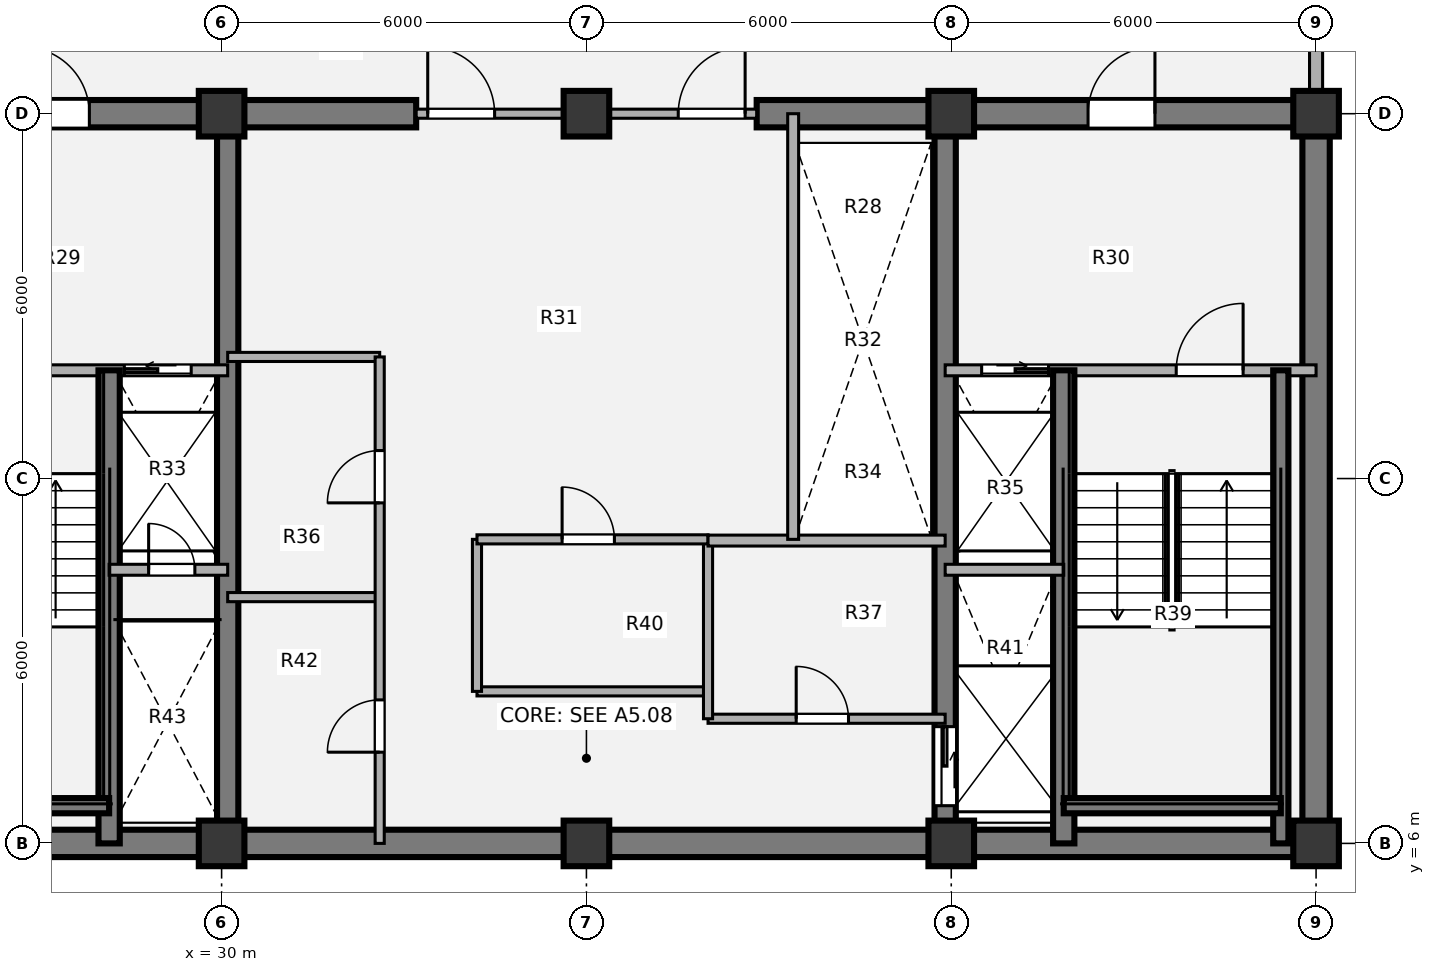
"""IFC4 building model, lengths in metres.
Left out: names, types, materials, properties, quantities, classifications, styles, units other than length and angle.
Written with IfcOpenShell. Run it as: python <this file> out.ifc"""

import sys

from ifc_helpers import new_model, si_unit, direction, frame, frame_2d, origin, origin_2d, place, context, subcontext, project, spatial, rectangle, extrude, source, transform, mapped, element, fill, save


model = new_model("IFC4")
c1 = context("Model", 3, precision=1e-05, world=origin(), true_north=direction((0.0, 1.0)))
c2 = subcontext(c1, "Body", "Model", "MODEL_VIEW")
j1 = project(units=[si_unit("LENGTHUNIT", "METRE"), si_unit("PLANEANGLEUNIT", "RADIAN")], contexts=[c1])
p1 = place(None, origin())
s1 = spatial("IfcSite", under=j1, at=p1, CompositionType="ELEMENT")
p2 = place(p1, origin())
s2 = spatial("IfcBuilding", under=s1, at=p2, CompositionType="ELEMENT")
p3 = place(p2, frame((0.0, 0.0, 163.98)))
s3 = spatial("IfcBuildingStorey", under=s2, at=p3, CompositionType="ELEMENT", Elevation=163.98)
m1 = source(origin(), c2, "Body", "SweptSolid", [
    extrude(rectangle(XDim=0.75, YDim=0.75, at=origin_2d()), origin(), (0.0, 0.0, 1.0), 3.78),
])
for number, where, z_axis, x_axis in (
    (1, (30.0, 6.0, 0.0), (0.0, 0.0, 1.0), (1.0, 0.0, 0.0)),
    (2, (36.0, 6.0, 0.0), (0.0, 0.0, 1.0), (1.0, 0.0, 0.0)),
    (3, (42.0, 6.0, 0.0), (0.0, 0.0, 1.0), (1.0, 0.0, 0.0)),
    (4, (48.0, 6.0, 0.0), (0.0, 0.0, 1.0), (1.0, 0.0, 0.0)),
    (5, (30.0, 18.0, 0.0), (0.0, 0.0, 1.0), (1.0, 0.0, 0.0)),
    (6, (36.0, 18.0, 0.0), (0.0, 0.0, 1.0), (1.0, 0.0, 0.0)),
    (7, (42.0, 18.0, 0.0), (0.0, 0.0, 1.0), (1.0, 0.0, 0.0)),
    (8, (48.0, 18.0, 0.0), (0.0, 0.0, 1.0), (1.0, 0.0, 0.0)),
):
    element("IfcColumn", number, at=place(p3, frame(where, z_axis=z_axis, x_axis=x_axis)), inside=s3, PredefinedType="COLUMN", context=c2, shape_type="MappedRepresentation", body=[
        mapped(m1, transform((0.0, 0.0, 0.0), x_axis=(1.0, 0.0, 0.0), y_axis=(0.0, 1.0, 0.0), z_axis=(0.0, 0.0, 1.0), scale=1.0)),
    ])
p4 = place(p3, frame((48.225, 6.0, 0.0), z_axis=(0.0, 0.0, 1.0), x_axis=(-1.0, 0.0, 0.0)))
e9 = element("IfcWall", 9, at=p4, inside=s3, PredefinedType="SHEAR", context=c2, shape_type="SweptSolid", body=[
    extrude(rectangle(XDim=24.45, YDim=0.45, at=frame_2d((12.225, 0.0))), origin(), (0.0, 0.0, 1.0), 3.78),
])
p5 = place(p3, frame((48.0, 18.0, 0.0), z_axis=(0.0, 0.0, 1.0), x_axis=(0.0, -1.0, 0.0)))
e10 = element("IfcWall", 10, at=p5, inside=s3, PredefinedType="SHEAR", context=c2, shape_type="SweptSolid", body=[
    extrude(rectangle(XDim=12.0, YDim=0.45, at=frame_2d((6.0, 0.0))), origin(), (0.0, 0.0, 1.0), 3.78),
])
p6 = place(p3, frame((23.775, 18.0, 0.0), z_axis=(0.0, 0.0, 1.0), x_axis=(1.0, 0.0, 0.0)))
e11 = element("IfcWall", 11, at=p6, inside=s3, PredefinedType="SHEAR", context=c2, shape_type="SweptSolid", body=[
    extrude(rectangle(XDim=9.425, YDim=0.45, at=frame_2d((4.712, 0.0))), origin(), (0.0, 0.0, 1.0), 3.78),
])
p7 = place(p6, frame((2.95, 0.0, 0.0)))
e12 = element("IfcOpeningElement", 12, at=p7, cuts=e11, PredefinedType="OPENING", context=c2, shape_type="SweptSolid", body=[
    extrude(rectangle(XDim=1.1, YDim=2.1, at=origin_2d()), frame((0.55, 0.235, 1.05), z_axis=(0.0, -1.0, 0.0), x_axis=(1.0, 0.0, 0.0)), (0.0, 0.0, 1.0), 0.47),
])
p8 = place(p3, frame((38.8, 18.0, 0.0), z_axis=(0.0, 0.0, 1.0), x_axis=(1.0, 0.0, 0.0)))
e13 = element("IfcWall", 13, at=p8, inside=s3, PredefinedType="SHEAR", context=c2, shape_type="SweptSolid", body=[
    extrude(rectangle(XDim=9.425, YDim=0.45, at=frame_2d((4.712, 0.0))), origin(), (0.0, 0.0, 1.0), 3.78),
])
p9 = place(p8, frame((5.45, 0.0, 0.0)))
e14 = element("IfcOpeningElement", 14, at=p9, cuts=e13, PredefinedType="OPENING", context=c2, shape_type="SweptSolid", body=[
    extrude(rectangle(XDim=1.1, YDim=2.1, at=origin_2d()), frame((0.55, 0.235, 1.05), z_axis=(0.0, -1.0, 0.0), x_axis=(1.0, 0.0, 0.0)), (0.0, 0.0, 1.0), 0.47),
])
p10 = place(p3, frame((30.1, 6.0, 0.0), z_axis=(0.0, 0.0, 1.0), x_axis=(0.0, 1.0, 0.0)))
e15 = element("IfcWall", 15, at=p10, inside=s3, PredefinedType="SHEAR", context=c2, shape_type="SweptSolid", body=[
    extrude(rectangle(XDim=12.0, YDim=0.35, at=frame_2d((6.0, 0.0))), origin(), (0.0, 0.0, 1.0), 3.78),
])
p11 = place(p3, frame((41.9, 18.0, 0.0), z_axis=(0.0, 0.0, 1.0), x_axis=(0.0, -1.0, 0.0)))
e16 = element("IfcWall", 16, at=p11, inside=s3, PredefinedType="SHEAR", context=c2, shape_type="SweptSolid", body=[
    extrude(rectangle(XDim=12.0, YDim=0.35, at=frame_2d((6.0, 0.0))), origin(), (0.0, 0.0, 1.0), 3.78),
])
p12 = place(p11, frame((10.08, 0.0, 0.0)))
e17 = element("IfcOpeningElement", 17, at=p12, cuts=e16, PredefinedType="OPENING", context=c2, shape_type="SweptSolid", body=[
    extrude(rectangle(XDim=1.3, YDim=2.1, at=origin_2d()), frame((0.65, 0.185, 1.05), z_axis=(0.0, -1.0, 0.0), x_axis=(1.0, 0.0, 0.0)), (0.0, 0.0, 1.0), 0.37),
])
p13 = place(p3, frame((48.0, 21.05, 0.0), z_axis=(0.0, 0.0, 1.0), x_axis=(0.0, -1.0, 0.0)))
e18 = element("IfcWall", 18, at=p13, inside=s3, PredefinedType="SOLIDWALL", context=c2, shape_type="SweptSolid", body=[
    extrude(rectangle(XDim=2.695, YDim=0.215, at=frame_2d((1.348, 0.0))), origin(), (0.0, 0.0, 1.0), 2.718),
])
p14 = place(p3, frame((30.1, 14.0, 0.0), z_axis=(0.0, 0.0, 1.0), x_axis=(1.0, 0.0, 0.0)))
e19 = element("IfcWall", 19, at=p14, inside=s3, PredefinedType="PARTITIONING", context=c2, shape_type="SweptSolid", body=[
    extrude(rectangle(XDim=2.5, YDim=0.15, at=frame_2d((1.25, 0.0))), origin(), (0.0, 0.0, 1.0), 3.5),
])
p15 = place(p3, frame((34.2, 8.5, 0.0), z_axis=(0.0, 0.0, 1.0), x_axis=(1.0, 0.0, 0.0)))
e20 = element("IfcWall", 20, at=p15, inside=s3, PredefinedType="PARTITIONING", context=c2, shape_type="SweptSolid", body=[
    extrude(rectangle(XDim=3.8, YDim=0.15, at=frame_2d((1.9, 0.0))), origin(), (0.0, 0.0, 1.0), 3.5),
])
p16 = place(p3, frame((38.0, 8.05, 0.0), z_axis=(0.0, 0.0, 1.0), x_axis=(1.0, 0.0, 0.0)))
e21 = element("IfcWall", 21, at=p16, inside=s3, PredefinedType="PARTITIONING", context=c2, shape_type="SweptSolid", body=[
    extrude(rectangle(XDim=3.9, YDim=0.15, at=frame_2d((1.95, 0.0))), origin(), (0.0, 0.0, 1.0), 3.5),
])
p17 = place(p16, frame((1.45, 0.0, 0.0)))
e22 = element("IfcOpeningElement", 22, at=p17, cuts=e21, PredefinedType="OPENING", context=c2, shape_type="SweptSolid", body=[
    extrude(rectangle(XDim=0.86, YDim=2.1, at=origin_2d()), frame((0.43, 0.085, 1.05), z_axis=(0.0, -1.0, 0.0), x_axis=(1.0, 0.0, 0.0)), (0.0, 0.0, 1.0), 0.17),
])
p18 = place(p3, frame((34.2, 8.5, 0.0), z_axis=(0.0, 0.0, 1.0), x_axis=(0.0, 1.0, 0.0)))
e23 = element("IfcWall", 23, at=p18, inside=s3, PredefinedType="PARTITIONING", context=c2, shape_type="SweptSolid", body=[
    extrude(rectangle(XDim=2.5, YDim=0.15, at=frame_2d((1.25, 0.0))), origin(), (0.0, 0.0, 1.0), 3.5),
])
p19 = place(p3, frame((38.0, 8.05, 0.0), z_axis=(0.0, 0.0, 1.0), x_axis=(0.0, 1.0, 0.0)))
e24 = element("IfcWall", 24, at=p19, inside=s3, PredefinedType="PARTITIONING", context=c2, shape_type="SweptSolid", body=[
    extrude(rectangle(XDim=2.95, YDim=0.15, at=frame_2d((1.475, 0.0))), origin(), (0.0, 0.0, 1.0), 3.5),
])
p20 = place(p3, frame((34.2, 11.0, 0.0), z_axis=(0.0, 0.0, 1.0), x_axis=(1.0, 0.0, 0.0)))
e25 = element("IfcWall", 25, at=p20, inside=s3, PredefinedType="PARTITIONING", context=c2, shape_type="SweptSolid", body=[
    extrude(rectangle(XDim=3.8, YDim=0.15, at=frame_2d((1.9, 0.0))), origin(), (0.0, 0.0, 1.0), 3.5),
])
p21 = place(p20, frame((1.4, 0.0, 0.0)))
e26 = element("IfcOpeningElement", 26, at=p21, cuts=e25, PredefinedType="OPENING", context=c2, shape_type="SweptSolid", body=[
    extrude(rectangle(XDim=0.86, YDim=2.1, at=origin_2d()), frame((0.43, 0.085, 1.05), z_axis=(0.0, -1.0, 0.0), x_axis=(1.0, 0.0, 0.0)), (0.0, 0.0, 1.0), 0.17),
])
p22 = place(p3, frame((38.0, 10.98, 0.0), z_axis=(0.0, 0.0, 1.0), x_axis=(1.0, 0.0, 0.0)))
e27 = element("IfcWall", 27, at=p22, inside=s3, PredefinedType="PARTITIONING", context=c2, shape_type="SweptSolid", body=[
    extrude(rectangle(XDim=3.9, YDim=0.18, at=frame_2d((1.95, 0.0))), origin(), (0.0, 0.0, 1.0), 3.5),
])
p23 = place(p3, frame((39.4, 11.0, 0.0), z_axis=(0.0, 0.0, 1.0), x_axis=(0.0, 1.0, 0.0)))
e28 = element("IfcWall", 28, at=p23, inside=s3, PredefinedType="PARTITIONING", context=c2, shape_type="SweptSolid", body=[
    extrude(rectangle(XDim=7.0, YDim=0.18, at=frame_2d((3.5, 0.0))), origin(), (0.0, 0.0, 1.0), 3.5),
])
p24 = place(p3, frame((30.1, 10.05, 0.0), z_axis=(0.0, 0.0, 1.0), x_axis=(1.0, 0.0, 0.0)))
e29 = element("IfcWall", 29, at=p24, inside=s3, PredefinedType="PARTITIONING", context=c2, shape_type="SweptSolid", body=[
    extrude(rectangle(XDim=2.5, YDim=0.15, at=frame_2d((1.25, 0.0))), origin(), (0.0, 0.0, 1.0), 3.5),
])
p25 = place(p3, frame((32.6, 6.0, 0.0), z_axis=(0.0, 0.0, 1.0), x_axis=(0.0, 1.0, 0.0)))
e30 = element("IfcWall", 30, at=p25, inside=s3, PredefinedType="PARTITIONING", context=c2, shape_type="SweptSolid", body=[
    extrude(rectangle(XDim=8.0, YDim=0.15, at=frame_2d((4.0, 0.0))), origin(), (0.0, 0.0, 1.0), 3.5),
])
p26 = place(p25, frame((1.5, 0.0, 0.0)))
e31 = element("IfcOpeningElement", 31, at=p26, cuts=e30, PredefinedType="OPENING", context=c2, shape_type="SweptSolid", body=[
    extrude(rectangle(XDim=0.86, YDim=2.1, at=origin_2d()), frame((0.43, 0.085, 1.05), z_axis=(0.0, -1.0, 0.0), x_axis=(1.0, 0.0, 0.0)), (0.0, 0.0, 1.0), 0.17),
])
p27 = place(p25, frame((5.6, 0.0, 0.0)))
e32 = element("IfcOpeningElement", 32, at=p27, cuts=e30, PredefinedType="OPENING", context=c2, shape_type="SweptSolid", body=[
    extrude(rectangle(XDim=0.86, YDim=2.1, at=origin_2d()), frame((0.43, 0.085, 1.05), z_axis=(0.0, -1.0, 0.0), x_axis=(1.0, 0.0, 0.0)), (0.0, 0.0, 1.0), 0.17),
])
p28 = place(p3, frame((33.2, 18.0, 0.0), z_axis=(0.0, 0.0, 1.0), x_axis=(1.0, 0.0, 0.0)))
e33 = element("IfcWall", 33, at=p28, inside=s3, PredefinedType="PARTITIONING", context=c2, shape_type="SweptSolid", body=[
    extrude(rectangle(XDim=5.6, YDim=0.15, at=frame_2d((2.8, 0.0))), origin(), (0.0, 0.0, 1.0), 2.515),
])
p29 = place(p28, frame((0.19, 0.0, 0.0)))
e34 = element("IfcOpeningElement", 34, at=p29, cuts=e33, PredefinedType="OPENING", context=c2, shape_type="SweptSolid", body=[
    extrude(rectangle(XDim=1.1, YDim=2.1, at=origin_2d()), frame((0.55, 0.085, 1.05), z_axis=(0.0, -1.0, 0.0), x_axis=(1.0, 0.0, 0.0)), (0.0, 0.0, 1.0), 0.17),
])
p30 = place(p28, frame((4.31, 0.0, 0.0)))
e35 = element("IfcOpeningElement", 35, at=p30, cuts=e33, PredefinedType="OPENING", context=c2, shape_type="SweptSolid", body=[
    extrude(rectangle(XDim=1.1, YDim=2.1, at=origin_2d()), frame((0.55, 0.085, 1.05), z_axis=(0.0, -1.0, 0.0), x_axis=(1.0, 0.0, 0.0)), (0.0, 0.0, 1.0), 0.17),
])
p31 = place(p3, frame((24.0, 13.78, 0.0), z_axis=(0.0, 0.0, 1.0), x_axis=(1.0, 0.0, 0.0)))
e36 = element("IfcWall", 36, at=p31, inside=s3, PredefinedType="PARTITIONING", context=c2, shape_type="SweptSolid", body=[
    extrude(rectangle(XDim=6.1, YDim=0.18, at=frame_2d((3.05, 0.0))), origin(), (0.0, 0.0, 1.0), 3.5),
])
p32 = place(p31, frame((1.15, 0.0, 0.0)))
e37 = element("IfcOpeningElement", 37, at=p32, cuts=e36, PredefinedType="OPENING", context=c2, shape_type="SweptSolid", body=[
    extrude(rectangle(XDim=1.1, YDim=2.1, at=origin_2d()), frame((0.55, 0.1, 1.05), z_axis=(0.0, -1.0, 0.0), x_axis=(1.0, 0.0, 0.0)), (0.0, 0.0, 1.0), 0.2),
])
p33 = place(p31, frame((4.4, 0.0, 0.0)))
e38 = element("IfcOpeningElement", 38, at=p33, cuts=e36, PredefinedType="OPENING", context=c2, shape_type="SweptSolid", body=[
    extrude(rectangle(XDim=1.1, YDim=2.1, at=origin_2d()), frame((0.55, 0.1, 1.05), z_axis=(0.0, -1.0, 0.0), x_axis=(1.0, 0.0, 0.0)), (0.0, 0.0, 1.0), 0.2),
])
p34 = place(p3, frame((28.15, 6.0, 0.0), z_axis=(0.0, 0.0, 1.0), x_axis=(0.0, 1.0, 0.0)))
e39 = element("IfcWall", 39, at=p34, inside=s3, PredefinedType="SHEAR", context=c2, shape_type="SweptSolid", body=[
    extrude(rectangle(XDim=7.78, YDim=0.35, at=frame_2d((3.89, 0.0))), origin(), (0.0, 0.0, 1.0), 3.85),
])
p35 = place(p3, frame((24.58, 6.62, 0.0), z_axis=(0.0, 0.0, 1.0), x_axis=(1.0, 0.0, 0.0)))
e40 = element("IfcWall", 40, at=p35, inside=s3, PredefinedType="SHEAR", context=c2, shape_type="SweptSolid", body=[
    extrude(rectangle(XDim=3.57, YDim=0.25, at=frame_2d((1.785, 0.0))), origin(), (0.0, 0.0, 1.0), 3.85),
])
p36 = place(p3, frame((28.15, 10.5, 0.0), z_axis=(0.0, 0.0, 1.0), x_axis=(1.0, 0.0, 0.0)))
e41 = element("IfcWall", 41, at=p36, inside=s3, PredefinedType="PARTITIONING", context=c2, shape_type="SweptSolid", body=[
    extrude(rectangle(XDim=1.95, YDim=0.18, at=frame_2d((0.975, 0.0))), origin(), (0.0, 0.0, 1.0), 3.5),
])
p37 = place(p36, frame((0.65, 0.0, 0.0)))
e42 = element("IfcOpeningElement", 42, at=p37, cuts=e41, PredefinedType="OPENING", context=c2, shape_type="SweptSolid", body=[
    extrude(rectangle(XDim=0.76, YDim=2.05, at=origin_2d()), frame((0.38, 0.1, 1.025), z_axis=(0.0, -1.0, 0.0), x_axis=(1.0, 0.0, 0.0)), (0.0, 0.0, 1.0), 0.2),
])
p38 = place(p3, frame((41.9, 13.78, 0.0), z_axis=(0.0, 0.0, 1.0), x_axis=(1.0, 0.0, 0.0)))
e43 = element("IfcWall", 43, at=p38, inside=s3, PredefinedType="PARTITIONING", context=c2, shape_type="SweptSolid", body=[
    extrude(rectangle(XDim=6.1, YDim=0.18, at=frame_2d((3.05, 0.0))), origin(), (0.0, 0.0, 1.0), 3.5),
])
p39 = place(p38, frame((0.6, 0.0, 0.0)))
e44 = element("IfcOpeningElement", 44, at=p39, cuts=e43, PredefinedType="OPENING", context=c2, shape_type="SweptSolid", body=[
    extrude(rectangle(XDim=1.1, YDim=2.1, at=origin_2d()), frame((0.55, 0.1, 1.05), z_axis=(0.0, -1.0, 0.0), x_axis=(1.0, 0.0, 0.0)), (0.0, 0.0, 1.0), 0.2),
])
p40 = place(p38, frame((3.8, 0.0, 0.0)))
e45 = element("IfcOpeningElement", 45, at=p40, cuts=e43, PredefinedType="OPENING", context=c2, shape_type="SweptSolid", body=[
    extrude(rectangle(XDim=1.1, YDim=2.1, at=origin_2d()), frame((0.55, 0.1, 1.05), z_axis=(0.0, -1.0, 0.0), x_axis=(1.0, 0.0, 0.0)), (0.0, 0.0, 1.0), 0.2),
])
p41 = place(p3, frame((43.85, 6.0, 0.0), z_axis=(0.0, 0.0, 1.0), x_axis=(0.0, 1.0, 0.0)))
e46 = element("IfcWall", 46, at=p41, inside=s3, PredefinedType="SHEAR", context=c2, shape_type="SweptSolid", body=[
    extrude(rectangle(XDim=7.78, YDim=0.35, at=frame_2d((3.89, 0.0))), origin(), (0.0, 0.0, 1.0), 3.85),
])
p42 = place(p3, frame((47.42, 6.0, 0.0), z_axis=(0.0, 0.0, 1.0), x_axis=(0.0, 1.0, 0.0)))
e47 = element("IfcWall", 47, at=p42, inside=s3, PredefinedType="SHEAR", context=c2, shape_type="SweptSolid", body=[
    extrude(rectangle(XDim=7.78, YDim=0.25, at=frame_2d((3.89, 0.0))), origin(), (0.0, 0.0, 1.0), 3.85),
])
p43 = place(p3, frame((43.85, 6.62, 0.0), z_axis=(0.0, 0.0, 1.0), x_axis=(1.0, 0.0, 0.0)))
e48 = element("IfcWall", 48, at=p43, inside=s3, PredefinedType="SHEAR", context=c2, shape_type="SweptSolid", body=[
    extrude(rectangle(XDim=3.57, YDim=0.25, at=frame_2d((1.785, 0.0))), origin(), (0.0, 0.0, 1.0), 3.85),
])
p44 = place(p3, frame((41.9, 10.5, 0.0), z_axis=(0.0, 0.0, 1.0), x_axis=(1.0, 0.0, 0.0)))
e49 = element("IfcWall", 49, at=p44, inside=s3, PredefinedType="PARTITIONING", context=c2, shape_type="SweptSolid", body=[
    extrude(rectangle(XDim=1.95, YDim=0.18, at=frame_2d((0.975, 0.0))), origin(), (0.0, 0.0, 1.0), 3.5),
])
m2 = source(origin(), c2, "Body", "SweptSolid", [
    extrude(rectangle(XDim=0.86, YDim=2.1, at=origin_2d()), frame((0.43, 0.025, 1.05), z_axis=(0.0, -1.0, 0.0), x_axis=(1.0, 0.0, 0.0)), (0.0, 0.0, 1.0), 0.05),
])
p45 = place(p17, origin())
e50 = element("IfcDoor", 50, at=p45, inside=s3, OperationType="SINGLE_SWING_LEFT", PredefinedType="DOOR", context=c2, shape_type="MappedRepresentation", body=[
    mapped(m2, transform((0.0, 0.0, 0.0), x_axis=(1.0, 0.0, 0.0), y_axis=(0.0, 1.0, 0.0), z_axis=(0.0, 0.0, 1.0), scale=1.0)),
])
fill(e22, e50)
p46 = place(p21, origin())
e51 = element("IfcDoor", 51, at=p46, inside=s3, OperationType="SINGLE_SWING_LEFT", PredefinedType="DOOR", context=c2, shape_type="MappedRepresentation", body=[
    mapped(m2, transform((0.0, 0.0, 0.0), x_axis=(1.0, 0.0, 0.0), y_axis=(0.0, 1.0, 0.0), z_axis=(0.0, 0.0, 1.0), scale=1.0)),
])
fill(e26, e51)
p47 = place(p26, origin())
e52 = element("IfcDoor", 52, at=p47, inside=s3, OperationType="SINGLE_SWING_LEFT", PredefinedType="DOOR", context=c2, shape_type="MappedRepresentation", body=[
    mapped(m2, transform((0.0, 0.0, 0.0), x_axis=(1.0, 0.0, 0.0), y_axis=(0.0, 1.0, 0.0), z_axis=(0.0, 0.0, 1.0), scale=1.0)),
])
fill(e31, e52)
p48 = place(p27, origin())
e53 = element("IfcDoor", 53, at=p48, inside=s3, OperationType="SINGLE_SWING_LEFT", PredefinedType="DOOR", context=c2, shape_type="MappedRepresentation", body=[
    mapped(m2, transform((0.0, 0.0, 0.0), x_axis=(1.0, 0.0, 0.0), y_axis=(0.0, 1.0, 0.0), z_axis=(0.0, 0.0, 1.0), scale=1.0)),
])
fill(e32, e53)
m3 = source(origin(), c2, "Body", "SweptSolid", [
    extrude(rectangle(XDim=1.1, YDim=2.1, at=origin_2d()), frame((0.55, 0.025, 1.05), z_axis=(0.0, -1.0, 0.0), x_axis=(1.0, 0.0, 0.0)), (0.0, 0.0, 1.0), 0.05),
])
p49 = place(p29, origin())
e54 = element("IfcDoor", 54, at=p49, inside=s3, OperationType="SINGLE_SWING_LEFT", PredefinedType="DOOR", context=c2, shape_type="MappedRepresentation", body=[
    mapped(m3, transform((0.0, 0.0, 0.0), x_axis=(1.0, 0.0, 0.0), y_axis=(0.0, 1.0, 0.0), z_axis=(0.0, 0.0, 1.0), scale=1.0)),
])
fill(e34, e54)
p50 = place(p30, origin())
e55 = element("IfcDoor", 55, at=p50, inside=s3, OperationType="SINGLE_SWING_RIGHT", PredefinedType="DOOR", context=c2, shape_type="MappedRepresentation", body=[
    mapped(m3, transform((0.0, 0.0, 0.0), x_axis=(1.0, 0.0, 0.0), y_axis=(0.0, 1.0, 0.0), z_axis=(0.0, 0.0, 1.0), scale=1.0)),
])
fill(e35, e55)
m4 = source(origin(), c2, "Body", "SweptSolid", [
    extrude(rectangle(XDim=1.1, YDim=2.1, at=origin_2d()), frame((0.55, 0.025, 1.05), z_axis=(0.0, -1.0, 0.0), x_axis=(1.0, 0.0, 0.0)), (0.0, 0.0, 1.0), 0.05),
])
p51 = place(p33, origin())
e56 = element("IfcDoor", 56, at=p51, inside=s3, OperationType="SLIDING_TO_LEFT", PredefinedType="DOOR", context=c2, shape_type="MappedRepresentation", body=[
    mapped(m4, transform((0.0, 0.0, 0.0), x_axis=(1.0, 0.0, 0.0), y_axis=(0.0, 1.0, 0.0), z_axis=(0.0, 0.0, 1.0), scale=1.0)),
])
fill(e38, e56)
m5 = source(origin(), c2, "Body", "SweptSolid", [
    extrude(rectangle(XDim=0.76, YDim=2.05, at=origin_2d()), frame((0.38, 0.025, 1.025), z_axis=(0.0, -1.0, 0.0), x_axis=(1.0, 0.0, 0.0)), (0.0, 0.0, 1.0), 0.05),
])
p52 = place(p37, origin())
e57 = element("IfcDoor", 57, at=p52, inside=s3, OperationType="SINGLE_SWING_LEFT", PredefinedType="DOOR", context=c2, shape_type="MappedRepresentation", body=[
    mapped(m5, transform((0.0, 0.0, 0.0), x_axis=(1.0, 0.0, 0.0), y_axis=(0.0, 1.0, 0.0), z_axis=(0.0, 0.0, 1.0), scale=1.0)),
])
fill(e42, e57)
p53 = place(p39, origin())
e58 = element("IfcDoor", 58, at=p53, inside=s3, OperationType="SLIDING_TO_RIGHT", PredefinedType="DOOR", context=c2, shape_type="MappedRepresentation", body=[
    mapped(m4, transform((0.0, 0.0, 0.0), x_axis=(1.0, 0.0, 0.0), y_axis=(0.0, 1.0, 0.0), z_axis=(0.0, 0.0, 1.0), scale=1.0)),
])
fill(e44, e58)
m6 = source(origin(), c2, "Body", "SweptSolid", [
    extrude(rectangle(XDim=1.1, YDim=2.1, at=origin_2d()), frame((0.55, 0.025, 1.05), z_axis=(0.0, -1.0, 0.0), x_axis=(1.0, 0.0, 0.0)), (0.0, 0.0, 1.0), 0.05),
])
p54 = place(p40, origin())
e59 = element("IfcDoor", 59, at=p54, inside=s3, OperationType="SINGLE_SWING_RIGHT", PredefinedType="DOOR", context=c2, shape_type="MappedRepresentation", body=[
    mapped(m6, transform((0.0, 0.0, 0.0), x_axis=(1.0, 0.0, 0.0), y_axis=(0.0, 1.0, 0.0), z_axis=(0.0, 0.0, 1.0), scale=1.0)),
])
fill(e45, e59)
m7 = source(origin(), c2, "Body", "SweptSolid", [
    extrude(rectangle(XDim=1.3, YDim=2.1, at=origin_2d()), frame((0.65, 0.025, 1.05), z_axis=(0.0, -1.0, 0.0), x_axis=(1.0, 0.0, 0.0)), (0.0, 0.0, 1.0), 0.05),
])
p55 = place(p12, origin())
e60 = element("IfcDoor", 60, at=p55, inside=s3, OperationType="SLIDING_TO_LEFT", PredefinedType="DOOR", context=c2, shape_type="MappedRepresentation", body=[
    mapped(m7, transform((0.0, 0.0, 0.0), x_axis=(1.0, 0.0, 0.0), y_axis=(0.0, 1.0, 0.0), z_axis=(0.0, 0.0, 1.0), scale=1.0)),
])
fill(e17, e60)
p56 = place(p7, origin())
e61 = element("IfcDoor", 61, at=p56, inside=s3, OperationType="SINGLE_SWING_LEFT", PredefinedType="DOOR", context=c2, shape_type="MappedRepresentation", body=[
    mapped(m3, transform((0.0, 0.0, 0.0), x_axis=(1.0, 0.0, 0.0), y_axis=(0.0, 1.0, 0.0), z_axis=(0.0, 0.0, 1.0), scale=1.0)),
])
fill(e12, e61)
p57 = place(p9, origin())
e62 = element("IfcDoor", 62, at=p57, inside=s3, OperationType="SINGLE_SWING_RIGHT", PredefinedType="DOOR", context=c2, shape_type="MappedRepresentation", body=[
    mapped(m3, transform((0.0, 0.0, 0.0), x_axis=(1.0, 0.0, 0.0), y_axis=(0.0, 1.0, 0.0), z_axis=(0.0, 0.0, 1.0), scale=1.0)),
])
fill(e14, e62)
save(model, sys.argv[1])
